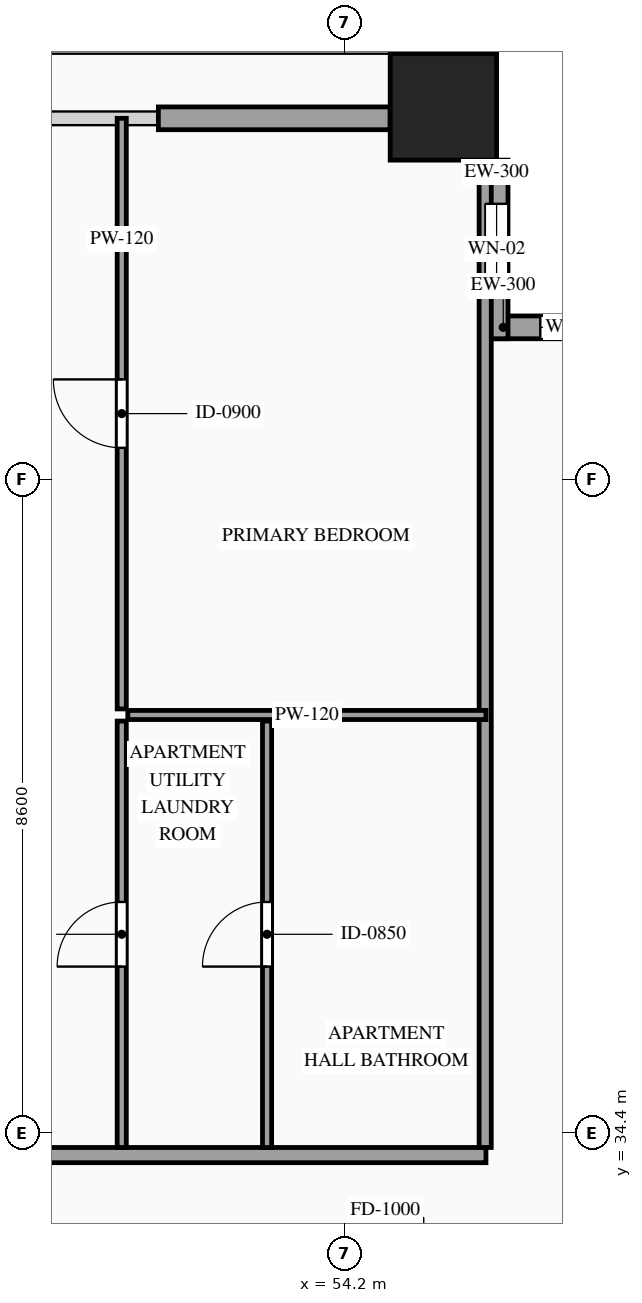
"""IFC4 building model, lengths in metres.
Left out: names, types, materials, properties, quantities, classifications, styles, units other than length and angle.
Written with IfcOpenShell. Run it as: python <this file> out.ifc"""

import sys

from ifc_helpers import new_model, si_unit, direction, frame, frame_2d, origin, origin_2d, place, context, subcontext, project, spatial, rectangle, hollow_rectangle, extrude, source, transform, mapped, element, fill, save


model = new_model("IFC4")
c1 = context("Model", 3, precision=1e-05, world=origin(), true_north=direction((0.0, 1.0)))
c2 = subcontext(c1, "Body", "Model", "MODEL_VIEW")
j1 = project(units=[si_unit("LENGTHUNIT", "METRE"), si_unit("PLANEANGLEUNIT", "RADIAN")], contexts=[c1])
p1 = place(None, origin())
s1 = spatial("IfcSite", under=j1, at=p1, CompositionType="ELEMENT")
p2 = place(p1, origin())
s2 = spatial("IfcBuilding", under=s1, at=p2, CompositionType="ELEMENT")
p3 = place(p2, frame((0.0, 0.0, 205.5)))
s3 = spatial("IfcBuildingStorey", under=s2, at=p3, CompositionType="ELEMENT", Elevation=205.5)
m1 = source(origin(), c2, "Body", "SweptSolid", [
    extrude(hollow_rectangle(XDim=1.4, YDim=1.4, WallThickness=0.06, at=origin_2d()), origin(), (0.0, 0.0, 1.0), 3.5),
])
p4 = place(p3, frame((55.5, 47.9, 0.0), z_axis=(0.0, 0.0, 1.0), x_axis=(1.0, 0.0, 0.0)))
e1 = element("IfcColumn", 1, at=p4, inside=s3, PredefinedType="COLUMN", context=c2, shape_type="MappedRepresentation", body=[
    mapped(m1, transform((0.0, 0.0, 0.0), scale=1.0)),
])
p5 = place(p3, frame((58.4, 45.0, 0.0), z_axis=(0.0, 0.0, 1.0), x_axis=(-1.0, 0.0, 0.0)))
e2 = element("IfcWall", 2, at=p5, inside=s3, PredefinedType="SOLIDWALL", context=c2, shape_type="SweptSolid", body=[
    extrude(rectangle(XDim=2.35, YDim=0.3, at=frame_2d((1.175, 0.0))), origin(), (0.0, 0.0, 1.0), 3.28),
])
p6 = place(p5, frame((0.725, 0.0, 0.85)))
e3 = element("IfcOpeningElement", 3, at=p6, cuts=e2, PredefinedType="OPENING", context=c2, shape_type="SweptSolid", body=[
    extrude(rectangle(XDim=0.9, YDim=1.5, at=frame_2d((0.45, 0.75))), frame((0.0, 0.165, 0.0), z_axis=(0.0, -1.0, 0.0), x_axis=(1.0, 0.0, 0.0)), (0.0, 0.0, 1.0), 0.33),
])
p7 = place(p3, frame((56.2, 44.85, 0.0), z_axis=(0.0, 0.0, 1.0), x_axis=(0.0, 1.0, 0.0)))
e4 = element("IfcWall", 4, at=p7, inside=s3, PredefinedType="SOLIDWALL", context=c2, shape_type="SweptSolid", body=[
    extrude(rectangle(XDim=2.35, YDim=0.3, at=frame_2d((1.175, 0.0))), origin(), (0.0, 0.0, 1.0), 3.28),
])
p8 = place(p7, frame((0.575, 0.0, 0.85)))
e5 = element("IfcOpeningElement", 5, at=p8, cuts=e4, PredefinedType="OPENING", context=c2, shape_type="SweptSolid", body=[
    extrude(rectangle(XDim=1.2, YDim=2.1, at=frame_2d((0.6, 1.05))), frame((0.0, 0.165, 0.0), z_axis=(0.0, -1.0, 0.0), x_axis=(1.0, 0.0, 0.0)), (0.0, 0.0, 1.0), 0.33),
])
m2 = source(origin(), c2, "Body", "SweptSolid", [
    extrude(rectangle(XDim=3.05, YDim=0.3, at=frame_2d((1.525, 0.0))), origin(), (0.0, 0.0, 1.0), 2.835),
])
p9 = place(p3, frame((51.75, 47.75, 0.0), z_axis=(0.0, 0.0, 1.0), x_axis=(1.0, 0.0, 0.0)))
e6 = element("IfcWall", 6, at=p9, inside=s3, PredefinedType="SOLIDWALL", context=c2, shape_type="MappedRepresentation", body=[
    mapped(m2, transform((0.0, 0.0, 0.0), scale=1.0)),
])
p10 = place(p3, frame((43.942, 34.11, 0.0), z_axis=(0.0, 0.0, 1.0), x_axis=(1.0, 0.0, 0.0)))
e7 = element("IfcWall", 7, at=p10, inside=s3, PredefinedType="PARTITIONING", context=c2, shape_type="SweptSolid", body=[
    extrude(rectangle(XDim=12.118, YDim=0.2, at=frame_2d((6.059, 0.0))), origin(), (0.0, 0.0, 1.0), 3.28),
])
p11 = place(p10, frame((5.003, 0.0, 0.0)))
e8 = element("IfcOpeningElement", 8, at=p11, cuts=e7, PredefinedType="OPENING", context=c2, shape_type="SweptSolid", body=[
    extrude(rectangle(XDim=1.0, YDim=2.2, at=frame_2d((0.5, 1.1))), frame((0.0, 0.115, 0.0), z_axis=(0.0, -1.0, 0.0), x_axis=(1.0, 0.0, 0.0)), (0.0, 0.0, 1.0), 0.23),
])
m3 = source(origin(), c2, "Body", "SweptSolid", [
    extrude(rectangle(XDim=13.39, YDim=0.16, at=frame_2d((6.695, 0.0))), origin(), (0.0, 0.0, 1.0), 3.28),
])
p12 = place(p3, frame((56.05, 34.21, 0.0), z_axis=(0.0, 0.0, 1.0), x_axis=(0.0, 1.0, 0.0)))
e9 = element("IfcWall", 9, at=p12, inside=s3, PredefinedType="PARTITIONING", context=c2, shape_type="MappedRepresentation", body=[
    mapped(m3, transform((0.0, 0.0, 0.0), scale=1.0)),
])
p13 = place(p3, frame((53.18, 34.21, 0.0), z_axis=(0.0, 0.0, 1.0), x_axis=(0.0, 1.0, 0.0)))
e10 = element("IfcWall", 10, at=p13, inside=s3, PredefinedType="PARTITIONING", context=c2, shape_type="SweptSolid", body=[
    extrude(rectangle(XDim=5.61, YDim=0.12, at=frame_2d((2.805, 0.0))), origin(), (0.0, 0.0, 1.0), 3.28),
])
p14 = place(p13, frame((2.38, 0.0, 0.0)))
e11 = element("IfcOpeningElement", 11, at=p14, cuts=e10, PredefinedType="OPENING", context=c2, shape_type="SweptSolid", body=[
    extrude(rectangle(XDim=0.85, YDim=2.1, at=frame_2d((0.425, 1.05))), frame((0.0, 0.075, 0.0), z_axis=(0.0, -1.0, 0.0), x_axis=(1.0, 0.0, 0.0)), (0.0, 0.0, 1.0), 0.15),
])
m4 = source(origin(), c2, "Body", "SweptSolid", [
    extrude(rectangle(XDim=4.712, YDim=0.12, at=frame_2d((2.356, 0.0))), origin(), (0.0, 0.0, 1.0), 3.28),
])
p15 = place(p3, frame((51.348, 39.9, 0.0), z_axis=(0.0, 0.0, 1.0), x_axis=(1.0, 0.0, 0.0)))
e12 = element("IfcWall", 12, at=p15, inside=s3, PredefinedType="PARTITIONING", context=c2, shape_type="MappedRepresentation", body=[
    mapped(m4, transform((0.0, 0.0, 0.0), scale=1.0)),
])
p16 = place(p3, frame((51.268, 39.98, 0.0), z_axis=(0.0, 0.0, 1.0), x_axis=(0.0, 1.0, 0.0)))
e13 = element("IfcWall", 13, at=p16, inside=s3, PredefinedType="PARTITIONING", context=c2, shape_type="SweptSolid", body=[
    extrude(rectangle(XDim=7.77, YDim=0.12, at=frame_2d((3.885, 0.0))), origin(), (0.0, 0.0, 1.0), 3.28),
])
p17 = place(p16, frame((3.435, 0.0, 0.0)))
e14 = element("IfcOpeningElement", 14, at=p17, cuts=e13, PredefinedType="OPENING", context=c2, shape_type="SweptSolid", body=[
    extrude(rectangle(XDim=0.9, YDim=2.15, at=frame_2d((0.45, 1.075))), frame((0.0, 0.075, 0.0), z_axis=(0.0, -1.0, 0.0), x_axis=(1.0, 0.0, 0.0)), (0.0, 0.0, 1.0), 0.15),
])
p18 = place(p3, frame((51.268, 34.21, 0.0), z_axis=(0.0, 0.0, 1.0), x_axis=(0.0, 1.0, 0.0)))
e15 = element("IfcWall", 15, at=p18, inside=s3, PredefinedType="PARTITIONING", context=c2, shape_type="SweptSolid", body=[
    extrude(rectangle(XDim=5.61, YDim=0.12, at=frame_2d((2.805, 0.0))), origin(), (0.0, 0.0, 1.0), 3.28),
])
p19 = place(p18, frame((2.38, 0.0, 0.0)))
e16 = element("IfcOpeningElement", 16, at=p19, cuts=e15, PredefinedType="OPENING", context=c2, shape_type="SweptSolid", body=[
    extrude(rectangle(XDim=0.85, YDim=2.1, at=frame_2d((0.425, 1.05))), frame((0.0, 0.075, 0.0), z_axis=(0.0, -1.0, 0.0), x_axis=(1.0, 0.0, 0.0)), (0.0, 0.0, 1.0), 0.15),
])
m5 = source(origin(), c2, "Body", "SweptSolid", [
    extrude(rectangle(XDim=0.9, YDim=1.5, at=frame_2d((0.45, 0.75))), frame((0.0, 0.03, 0.0), z_axis=(0.0, -1.0, 0.0), x_axis=(1.0, 0.0, 0.0)), (0.0, 0.0, 1.0), 0.06),
])
p20 = place(p6, origin())
e17 = element("IfcWindow", 17, at=p20, inside=s3, PartitioningType="SINGLE_PANEL", PredefinedType="WINDOW", context=c2, shape_type="MappedRepresentation", body=[
    mapped(m5, transform((0.0, 0.0, 0.0), scale=1.0)),
])
fill(e3, e17)
m6 = source(origin(), c2, "Body", "SweptSolid", [
    extrude(rectangle(XDim=1.2, YDim=2.1, at=frame_2d((0.6, 1.05))), frame((0.0, 0.03, 0.0), z_axis=(0.0, -1.0, 0.0), x_axis=(1.0, 0.0, 0.0)), (0.0, 0.0, 1.0), 0.06),
])
p21 = place(p8, origin())
e18 = element("IfcWindow", 18, at=p21, inside=s3, PartitioningType="SINGLE_PANEL", PredefinedType="WINDOW", context=c2, shape_type="MappedRepresentation", body=[
    mapped(m6, transform((0.0, 0.0, 0.0), scale=1.0)),
])
fill(e5, e18)
m7 = source(origin(), c2, "Body", "SweptSolid", [
    extrude(rectangle(XDim=0.85, YDim=2.1, at=frame_2d((0.425, 1.05))), frame((0.0, 0.025, 0.0), z_axis=(0.0, -1.0, 0.0), x_axis=(1.0, 0.0, 0.0)), (0.0, 0.0, 1.0), 0.05),
])
p22 = place(p14, origin())
e19 = element("IfcDoor", 19, at=p22, inside=s3, OperationType="SINGLE_SWING_LEFT", PredefinedType="DOOR", context=c2, shape_type="MappedRepresentation", body=[
    mapped(m7, transform((0.0, 0.0, 0.0), scale=1.0)),
])
fill(e11, e19)
m8 = source(origin(), c2, "Body", "SweptSolid", [
    extrude(rectangle(XDim=0.9, YDim=2.15, at=frame_2d((0.45, 1.075))), frame((0.0, 0.025, 0.0), z_axis=(0.0, -1.0, 0.0), x_axis=(1.0, 0.0, 0.0)), (0.0, 0.0, 1.0), 0.05),
])
p23 = place(p17, origin())
e20 = element("IfcDoor", 20, at=p23, inside=s3, OperationType="SINGLE_SWING_RIGHT", PredefinedType="DOOR", context=c2, shape_type="MappedRepresentation", body=[
    mapped(m8, transform((0.0, 0.0, 0.0), scale=1.0)),
])
fill(e14, e20)
p24 = place(p19, origin())
e21 = element("IfcDoor", 21, at=p24, inside=s3, OperationType="SINGLE_SWING_LEFT", PredefinedType="DOOR", context=c2, shape_type="MappedRepresentation", body=[
    mapped(m7, transform((0.0, 0.0, 0.0), scale=1.0)),
])
fill(e16, e21)
save(model, sys.argv[1])
